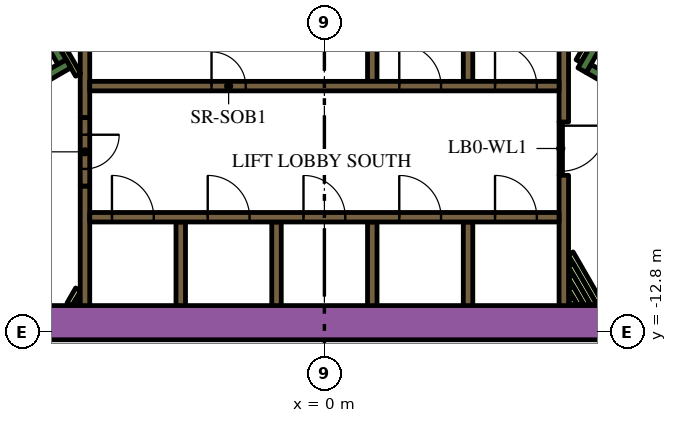
"""IFC4 building model, lengths in metres.
Left out: names, types, materials, properties, quantities, classifications, styles, units other than length and angle.
Written with IfcOpenShell. Run it as: python <this file> out.ifc"""

import sys

from ifc_helpers import new_model, si_unit, direction, frame, frame_2d, origin, place, context, subcontext, project, spatial, rectangle, extrude, element, fill, save


model = new_model("IFC4")
c1 = context("Model", 3, precision=1e-05, world=origin(), true_north=direction((0.0, 1.0)))
c2 = subcontext(c1, "Body", "Model", "MODEL_VIEW")
j1 = project(units=[si_unit("LENGTHUNIT", "METRE"), si_unit("PLANEANGLEUNIT", "RADIAN")], contexts=[c1])
p1 = place(None, origin())
s1 = spatial("IfcSite", under=j1, at=p1, CompositionType="ELEMENT")
p2 = place(p1, origin())
s2 = spatial("IfcBuilding", under=s1, at=p2, CompositionType="ELEMENT")
p3 = place(p2, frame((0.0, 0.0, 118.8)))
s3 = spatial("IfcBuildingStorey", under=s2, at=p3, CompositionType="ELEMENT", Elevation=118.8)
p4 = place(p3, frame((-12.019, -12.55, 0.0), z_axis=(0.0, 0.0, 1.0), x_axis=(1.0, 0.0, 0.0)))
e1 = element("IfcWall", 1, at=p4, inside=s3, PredefinedType="SOLIDWALL", context=c2, shape_type="SweptSolid", body=[
    extrude(rectangle(XDim=22.083, YDim=0.9, at=frame_2d((11.042, 0.0))), origin(), (0.0, 0.0, 1.0), 3.9),
])
p5 = place(p3, frame((12.84, -9.261, 0.0), z_axis=(0.0, 0.0, 1.0), x_axis=(-0.866013990052, 0.500019768644, 0.0)))
e2 = element("IfcWall", 2, at=p5, inside=s3, PredefinedType="SOLIDWALL", context=c2, shape_type="SweptSolid", body=[
    extrude(rectangle(XDim=6.8, YDim=0.25, at=frame_2d((3.4, 0.0))), origin(), (0.0, 0.0, 1.0), 3.9),
])
p6 = place(p3, frame((6.78, -5.906, 0.0), z_axis=(0.0, 0.0, 1.0), x_axis=(0.500223362819, 0.865896406789, 0.0)))
e3 = element("IfcWall", 3, at=p6, inside=s3, PredefinedType="SOLIDWALL", context=c2, shape_type="SweptSolid", body=[
    extrude(rectangle(XDim=0.675, YDim=0.25, at=frame_2d((0.337, 0.0))), origin(), (0.0, 0.0, 1.0), 3.9),
])
p7 = place(p3, frame((-12.84, -9.261, 0.0), z_axis=(0.0, 0.0, 1.0), x_axis=(0.866016039709, 0.500016218704, 0.0)))
e4 = element("IfcWall", 4, at=p7, inside=s3, PredefinedType="SOLIDWALL", context=c2, shape_type="SweptSolid", body=[
    extrude(rectangle(XDim=7.05, YDim=0.25, at=frame_2d((3.525, 0.0))), origin(), (0.0, 0.0, 1.0), 3.9),
])
p8 = place(p3, frame((-6.905, -5.69, 0.0), z_axis=(0.0, 0.0, 1.0), x_axis=(-0.500402024738, 0.865793170242, 0.0)))
e5 = element("IfcWall", 5, at=p8, inside=s3, PredefinedType="SOLIDWALL", context=c2, shape_type="SweptSolid", body=[
    extrude(rectangle(XDim=0.425, YDim=0.25, at=frame_2d((0.212, 0.0))), origin(), (0.0, 0.0, 1.0), 3.9),
])
p9 = place(p3, frame((-3.78, -12.1, 0.0), z_axis=(0.0, 0.0, 1.0), x_axis=(0.0, 1.0, 0.0)))
e6 = element("IfcWall", 6, at=p9, inside=s3, PredefinedType="SOLIDWALL", context=c2, shape_type="SweptSolid", body=[
    extrude(rectangle(XDim=2.2, YDim=0.25, at=frame_2d((1.1, 0.0))), origin(), (0.0, 0.0, 1.0), 3.9),
])
p10 = place(p3, frame((-6.3, -12.1, 0.0), z_axis=(0.0, 0.0, 1.0), x_axis=(0.0, 1.0, 0.0)))
e7 = element("IfcWall", 7, at=p10, inside=s3, PredefinedType="SOLIDWALL", context=c2, shape_type="SweptSolid", body=[
    extrude(rectangle(XDim=3.146, YDim=0.25, at=frame_2d((1.573, 0.0))), origin(), (0.0, 0.0, 1.0), 3.9),
])
for number, where, z_axis, x_axis in (
    (8, (3.78, -4.0, 0.0), (0.0, 0.0, 1.0), (0.0, -1.0, 0.0)),
    (9, (1.26, -4.0, 0.0), (0.0, 0.0, 1.0), (0.0, -1.0, 0.0)),
):
    element("IfcWall", number, at=place(p3, frame(where, z_axis=z_axis, x_axis=x_axis)), inside=s3, PredefinedType="SOLIDWALL", context=c2, shape_type="SweptSolid", body=[
        extrude(rectangle(XDim=2.2, YDim=0.25, at=frame_2d((1.1, 0.0))), origin(), (0.0, 0.0, 1.0), 3.9),
    ])
p11 = place(p3, frame((-6.3, -3.75, 0.0), z_axis=(0.0, 0.0, 1.0), x_axis=(0.0, -1.0, 0.0)))
e10 = element("IfcWall", 10, at=p11, inside=s3, PredefinedType="SOLIDWALL", context=c2, shape_type="SweptSolid", body=[
    extrude(rectangle(XDim=3.404, YDim=0.25, at=frame_2d((1.702, 0.0))), origin(), (0.0, 0.0, 1.0), 3.9),
])
p12 = place(p3, frame((6.3, -7.27, 0.0), z_axis=(0.0, 0.0, 1.0), x_axis=(0.0, 1.0, 0.0)))
e11 = element("IfcWall", 11, at=p12, inside=s3, PredefinedType="SOLIDWALL", context=c2, shape_type="SweptSolid", body=[
    extrude(rectangle(XDim=3.586, YDim=0.25, at=frame_2d((1.793, 0.0))), origin(), (0.0, 0.0, 1.0), 3.9),
])
p13 = place(p3, frame((6.3, -12.1, 0.0), z_axis=(0.0, 0.0, 1.0), x_axis=(0.0, 1.0, 0.0)))
e12 = element("IfcWall", 12, at=p13, inside=s3, PredefinedType="SOLIDWALL", context=c2, shape_type="SweptSolid", body=[
    extrude(rectangle(XDim=3.428, YDim=0.25, at=frame_2d((1.714, 0.0))), origin(), (0.0, 0.0, 1.0), 3.9),
])
for number, where, z_axis, x_axis in (
    (13, (3.78, -12.1, 0.0), (0.0, 0.0, 1.0), (0.0, 1.0, 0.0)),
    (14, (1.26, -12.1, 0.0), (0.0, 0.0, 1.0), (0.0, 1.0, 0.0)),
    (15, (-1.26, -12.1, 0.0), (0.0, 0.0, 1.0), (0.0, 1.0, 0.0)),
):
    element("IfcWall", number, at=place(p3, frame(where, z_axis=z_axis, x_axis=x_axis)), inside=s3, PredefinedType="SOLIDWALL", context=c2, shape_type="SweptSolid", body=[
        extrude(rectangle(XDim=2.2, YDim=0.25, at=frame_2d((1.1, 0.0))), origin(), (0.0, 0.0, 1.0), 3.9),
    ])
p14 = place(p3, frame((-6.708, -12.068, 0.0), z_axis=(0.0, 0.0, 1.0), x_axis=(0.500000789788, 0.8660249478, 0.0)))
e16 = element("IfcWall", 16, at=p14, inside=s3, PredefinedType="PARTITIONING", context=c2, shape_type="SweptSolid", body=[
    extrude(rectangle(XDim=0.456, YDim=0.15, at=frame_2d((0.228, 0.0))), origin(), (0.0, 0.0, 1.0), 2.75),
])
p15 = place(p3, frame((-6.534, -12.068, 0.0), z_axis=(0.0, 0.0, 1.0), x_axis=(0.500240224089, 0.865886665912, 0.0)))
e17 = element("IfcWall", 17, at=p15, inside=s3, PredefinedType="PARTITIONING", context=c2, shape_type="SweptSolid", body=[
    extrude(rectangle(XDim=0.109, YDim=0.15, at=frame_2d((0.054, 0.0))), origin(), (0.0, 0.0, 1.0), 2.75),
])
p16 = place(p3, frame((-6.48, -6.027, 0.0), z_axis=(0.0, 0.0, 1.0), x_axis=(-0.499927229454, 0.866067413802, 0.0)))
e18 = element("IfcWall", 18, at=p16, inside=s3, PredefinedType="PARTITIONING", context=c2, shape_type="SweptSolid", body=[
    extrude(rectangle(XDim=0.929, YDim=0.15, at=frame_2d((0.464, 0.0))), origin(), (0.0, 0.0, 1.0), 3.9),
])
p17 = place(p3, frame((6.48, -10.726, 0.0), z_axis=(0.0, 0.0, 1.0), x_axis=(0.500017819788, -0.86601511528, 0.0)))
e19 = element("IfcWall", 19, at=p17, inside=s3, PredefinedType="PARTITIONING", context=c2, shape_type="SweptSolid", body=[
    extrude(rectangle(XDim=1.55, YDim=0.15, at=frame_2d((0.775, 0.0))), origin(), (0.0, 0.0, 1.0), 2.75),
])
p18 = place(p3, frame((6.48, -11.026, 0.0), z_axis=(0.0, 0.0, 1.0), x_axis=(0.49995654735, -0.86605048973, 0.0)))
e20 = element("IfcWall", 20, at=p18, inside=s3, PredefinedType="PARTITIONING", context=c2, shape_type="SweptSolid", body=[
    extrude(rectangle(XDim=1.204, YDim=0.15, at=frame_2d((0.602, 0.0))), origin(), (0.0, 0.0, 1.0), 2.75),
])
p19 = place(p3, frame((6.48, -11.326, 0.0), z_axis=(0.0, 0.0, 1.0), x_axis=(0.500059337743, -0.865991142412, 0.0)))
e21 = element("IfcWall", 21, at=p19, inside=s3, PredefinedType="PARTITIONING", context=c2, shape_type="SweptSolid", body=[
    extrude(rectangle(XDim=0.857, YDim=0.15, at=frame_2d((0.429, 0.0))), origin(), (0.0, 0.0, 1.0), 2.75),
])
p20 = place(p3, frame((6.48, -11.626, 0.0), z_axis=(0.0, 0.0, 1.0), x_axis=(0.500301480982, -0.865851273677, 0.0)))
e22 = element("IfcWall", 22, at=p20, inside=s3, PredefinedType="PARTITIONING", context=c2, shape_type="SweptSolid", body=[
    extrude(rectangle(XDim=0.511, YDim=0.15, at=frame_2d((0.255, 0.0))), origin(), (0.0, 0.0, 1.0), 2.75),
])
p21 = place(p3, frame((6.48, -11.926, 0.0), z_axis=(0.0, 0.0, 1.0), x_axis=(0.500450775723, -0.86576499183, 0.0)))
e23 = element("IfcWall", 23, at=p21, inside=s3, PredefinedType="PARTITIONING", context=c2, shape_type="SweptSolid", body=[
    extrude(rectangle(XDim=0.164, YDim=0.15, at=frame_2d((0.082, 0.0))), origin(), (0.0, 0.0, 1.0), 2.75),
])
p22 = place(p3, frame((6.945, -5.222, 0.0), z_axis=(0.0, 0.0, 1.0), x_axis=(-0.499818422106, -0.866130212453, 0.0)))
e24 = element("IfcWall", 24, at=p22, inside=s3, PredefinedType="PARTITIONING", context=c2, shape_type="SweptSolid", body=[
    extrude(rectangle(XDim=0.514, YDim=0.15, at=frame_2d((0.257, 0.0))), origin(), (0.0, 0.0, 1.0), 2.75),
])
p23 = place(p3, frame((-6.175, -9.775, 0.0), z_axis=(0.0, 0.0, 1.0), x_axis=(1.0, 0.0, 0.0)))
e25 = element("IfcWall", 25, at=p23, inside=s3, PredefinedType="SOLIDWALL", context=c2, shape_type="SweptSolid", body=[
    extrude(rectangle(XDim=12.35, YDim=0.25, at=frame_2d((6.175, 0.0))), origin(), (0.0, 0.0, 1.0), 3.9),
])
p24 = place(p23, frame((0.585, 0.0, 0.0)))
e26 = element("IfcOpeningElement", 26, at=p24, cuts=e25, PredefinedType="OPENING", context=c2, shape_type="SweptSolid", body=[
    extrude(rectangle(XDim=1.1, YDim=2.1, at=frame_2d((0.55, 1.05))), frame((0.0, 0.135, 0.0), z_axis=(0.0, -1.0, 0.0), x_axis=(1.0, 0.0, 0.0)), (0.0, 0.0, 1.0), 0.27),
])
p25 = place(p23, frame((3.105, 0.0, 0.0)))
e27 = element("IfcOpeningElement", 27, at=p25, cuts=e25, PredefinedType="OPENING", context=c2, shape_type="SweptSolid", body=[
    extrude(rectangle(XDim=1.1, YDim=2.1, at=frame_2d((0.55, 1.05))), frame((0.0, 0.135, 0.0), z_axis=(0.0, -1.0, 0.0), x_axis=(1.0, 0.0, 0.0)), (0.0, 0.0, 1.0), 0.27),
])
p26 = place(p23, frame((5.625, 0.0, 0.0)))
e28 = element("IfcOpeningElement", 28, at=p26, cuts=e25, PredefinedType="OPENING", context=c2, shape_type="SweptSolid", body=[
    extrude(rectangle(XDim=1.1, YDim=2.1, at=frame_2d((0.55, 1.05))), frame((0.0, 0.135, 0.0), z_axis=(0.0, -1.0, 0.0), x_axis=(1.0, 0.0, 0.0)), (0.0, 0.0, 1.0), 0.27),
])
p27 = place(p23, frame((8.145, 0.0, 0.0)))
e29 = element("IfcOpeningElement", 29, at=p27, cuts=e25, PredefinedType="OPENING", context=c2, shape_type="SweptSolid", body=[
    extrude(rectangle(XDim=1.1, YDim=2.1, at=frame_2d((0.55, 1.05))), frame((0.0, 0.135, 0.0), z_axis=(0.0, -1.0, 0.0), x_axis=(1.0, 0.0, 0.0)), (0.0, 0.0, 1.0), 0.27),
])
p28 = place(p23, frame((10.665, 0.0, 0.0)))
e30 = element("IfcOpeningElement", 30, at=p28, cuts=e25, PredefinedType="OPENING", context=c2, shape_type="SweptSolid", body=[
    extrude(rectangle(XDim=1.1, YDim=2.1, at=frame_2d((0.55, 1.05))), frame((0.0, 0.135, 0.0), z_axis=(0.0, -1.0, 0.0), x_axis=(1.0, 0.0, 0.0)), (0.0, 0.0, 1.0), 0.27),
])
p29 = place(p3, frame((-6.175, -6.325, 0.0), z_axis=(0.0, 0.0, 1.0), x_axis=(1.0, 0.0, 0.0)))
e31 = element("IfcWall", 31, at=p29, inside=s3, PredefinedType="SOLIDWALL", context=c2, shape_type="SweptSolid", body=[
    extrude(rectangle(XDim=12.35, YDim=0.25, at=frame_2d((6.175, 0.0))), origin(), (0.0, 0.0, 1.0), 3.9),
])
p30 = place(p29, frame((3.205, 0.0, 0.0)))
e32 = element("IfcOpeningElement", 32, at=p30, cuts=e31, PredefinedType="OPENING", context=c2, shape_type="SweptSolid", body=[
    extrude(rectangle(XDim=0.9, YDim=2.1, at=frame_2d((0.45, 1.05))), frame((0.0, 0.135, 0.0), z_axis=(0.0, -1.0, 0.0), x_axis=(1.0, 0.0, 0.0)), (0.0, 0.0, 1.0), 0.27),
])
p31 = place(p29, frame((8.145, 0.0, 0.0)))
e33 = element("IfcOpeningElement", 33, at=p31, cuts=e31, PredefinedType="OPENING", context=c2, shape_type="SweptSolid", body=[
    extrude(rectangle(XDim=1.1, YDim=2.1, at=frame_2d((0.55, 1.05))), frame((0.0, 0.135, 0.0), z_axis=(0.0, -1.0, 0.0), x_axis=(1.0, 0.0, 0.0)), (0.0, 0.0, 1.0), 0.27),
])
p32 = place(p29, frame((10.665, 0.0, 0.0)))
e34 = element("IfcOpeningElement", 34, at=p32, cuts=e31, PredefinedType="OPENING", context=c2, shape_type="SweptSolid", body=[
    extrude(rectangle(XDim=1.1, YDim=2.1, at=frame_2d((0.55, 1.05))), frame((0.0, 0.135, 0.0), z_axis=(0.0, -1.0, 0.0), x_axis=(1.0, 0.0, 0.0)), (0.0, 0.0, 1.0), 0.27),
])
p33 = place(p3, frame((-6.3, -7.154, 0.0), z_axis=(0.0, 0.0, 1.0), x_axis=(0.0, -1.0, 0.0)))
e35 = element("IfcWall", 35, at=p33, inside=s3, PredefinedType="SOLIDWALL", context=c2, shape_type="SweptSolid", body=[
    extrude(rectangle(XDim=1.8, YDim=0.25, at=frame_2d((0.9, 0.0))), origin(), (0.0, 0.0, 1.0), 3.9),
])
p34 = place(p33, frame((0.45, 0.0, 0.0)))
e36 = element("IfcOpeningElement", 36, at=p34, cuts=e35, PredefinedType="OPENING", context=c2, shape_type="SweptSolid", body=[
    extrude(rectangle(XDim=0.9, YDim=2.1, at=frame_2d((0.45, 1.05))), frame((0.0, 0.135, 0.0), z_axis=(0.0, -1.0, 0.0), x_axis=(1.0, 0.0, 0.0)), (0.0, 0.0, 1.0), 0.27),
])
p35 = place(p3, frame((6.22, -7.266, 0.0), z_axis=(0.0, 0.0, 1.0), x_axis=(0.0, -1.0, 0.0)))
e37 = element("IfcWall", 37, at=p35, inside=s3, PredefinedType="PARTITIONING", context=c2, shape_type="SweptSolid", body=[
    extrude(rectangle(XDim=1.4, YDim=0.09, at=frame_2d((0.7, 0.0))), origin(), (0.0, 0.0, 1.0), 2.75),
])
p36 = place(p35, frame((0.1, 0.0, 0.0)))
e38 = element("IfcOpeningElement", 38, at=p36, cuts=e37, PredefinedType="OPENING", context=c2, shape_type="SweptSolid", body=[
    extrude(rectangle(XDim=1.2, YDim=2.1, at=frame_2d((0.6, 1.05))), frame((0.0, 0.055, 0.0), z_axis=(0.0, -1.0, 0.0), x_axis=(1.0, 0.0, 0.0)), (0.0, 0.0, 1.0), 0.11),
])
p37 = place(p24, origin())
e39 = element("IfcDoor", 39, at=p37, inside=s3, OperationType="DOUBLE_DOOR_SLIDING", PredefinedType="DOOR", context=c2, shape_type="SweptSolid", body=[
    extrude(rectangle(XDim=1.1, YDim=2.1, at=frame_2d((0.55, 1.05))), frame((0.0, 0.025, 0.0), z_axis=(0.0, -1.0, 0.0), x_axis=(1.0, 0.0, 0.0)), (0.0, 0.0, 1.0), 0.05),
])
fill(e26, e39)
p38 = place(p25, origin())
e40 = element("IfcDoor", 40, at=p38, inside=s3, OperationType="DOUBLE_DOOR_SLIDING", PredefinedType="DOOR", context=c2, shape_type="SweptSolid", body=[
    extrude(rectangle(XDim=1.1, YDim=2.1, at=frame_2d((0.55, 1.05))), frame((0.0, 0.025, 0.0), z_axis=(0.0, -1.0, 0.0), x_axis=(1.0, 0.0, 0.0)), (0.0, 0.0, 1.0), 0.05),
])
fill(e27, e40)
p39 = place(p26, origin())
e41 = element("IfcDoor", 41, at=p39, inside=s3, OperationType="DOUBLE_DOOR_SLIDING", PredefinedType="DOOR", context=c2, shape_type="SweptSolid", body=[
    extrude(rectangle(XDim=1.1, YDim=2.1, at=frame_2d((0.55, 1.05))), frame((0.0, 0.025, 0.0), z_axis=(0.0, -1.0, 0.0), x_axis=(1.0, 0.0, 0.0)), (0.0, 0.0, 1.0), 0.05),
])
fill(e28, e41)
p40 = place(p27, origin())
e42 = element("IfcDoor", 42, at=p40, inside=s3, OperationType="DOUBLE_DOOR_SLIDING", PredefinedType="DOOR", context=c2, shape_type="SweptSolid", body=[
    extrude(rectangle(XDim=1.1, YDim=2.1, at=frame_2d((0.55, 1.05))), frame((0.0, 0.025, 0.0), z_axis=(0.0, -1.0, 0.0), x_axis=(1.0, 0.0, 0.0)), (0.0, 0.0, 1.0), 0.05),
])
fill(e29, e42)
p41 = place(p28, origin())
e43 = element("IfcDoor", 43, at=p41, inside=s3, OperationType="DOUBLE_DOOR_SLIDING", PredefinedType="DOOR", context=c2, shape_type="SweptSolid", body=[
    extrude(rectangle(XDim=1.1, YDim=2.1, at=frame_2d((0.55, 1.05))), frame((0.0, 0.025, 0.0), z_axis=(0.0, -1.0, 0.0), x_axis=(1.0, 0.0, 0.0)), (0.0, 0.0, 1.0), 0.05),
])
fill(e30, e43)
p42 = place(p30, origin())
e44 = element("IfcDoor", 44, at=p42, inside=s3, OperationType="SINGLE_SWING_LEFT", PredefinedType="DOOR", context=c2, shape_type="SweptSolid", body=[
    extrude(rectangle(XDim=0.9, YDim=2.1, at=frame_2d((0.45, 1.05))), frame((0.0, 0.025, 0.0), z_axis=(0.0, -1.0, 0.0), x_axis=(1.0, 0.0, 0.0)), (0.0, 0.0, 1.0), 0.05),
])
fill(e32, e44)
p43 = place(p31, origin())
e45 = element("IfcDoor", 45, at=p43, inside=s3, OperationType="DOUBLE_DOOR_SLIDING", PredefinedType="DOOR", context=c2, shape_type="SweptSolid", body=[
    extrude(rectangle(XDim=1.1, YDim=2.1, at=frame_2d((0.55, 1.05))), frame((0.0, 0.025, 0.0), z_axis=(0.0, -1.0, 0.0), x_axis=(1.0, 0.0, 0.0)), (0.0, 0.0, 1.0), 0.05),
])
fill(e33, e45)
p44 = place(p32, origin())
e46 = element("IfcDoor", 46, at=p44, inside=s3, OperationType="DOUBLE_DOOR_SLIDING", PredefinedType="DOOR", context=c2, shape_type="SweptSolid", body=[
    extrude(rectangle(XDim=1.1, YDim=2.1, at=frame_2d((0.55, 1.05))), frame((0.0, 0.025, 0.0), z_axis=(0.0, -1.0, 0.0), x_axis=(1.0, 0.0, 0.0)), (0.0, 0.0, 1.0), 0.05),
])
fill(e34, e46)
p45 = place(p34, origin())
e47 = element("IfcDoor", 47, at=p45, inside=s3, OperationType="SINGLE_SWING_LEFT", PredefinedType="DOOR", context=c2, shape_type="SweptSolid", body=[
    extrude(rectangle(XDim=0.9, YDim=2.1, at=frame_2d((0.45, 1.05))), frame((0.0, 0.025, 0.0), z_axis=(0.0, -1.0, 0.0), x_axis=(1.0, 0.0, 0.0)), (0.0, 0.0, 1.0), 0.05),
])
fill(e36, e47)
p46 = place(p36, origin())
e48 = element("IfcDoor", 48, at=p46, inside=s3, OperationType="SINGLE_SWING_LEFT", PredefinedType="DOOR", context=c2, shape_type="SweptSolid", body=[
    extrude(rectangle(XDim=1.2, YDim=2.1, at=frame_2d((0.6, 1.05))), frame((0.0, 0.025, 0.0), z_axis=(0.0, -1.0, 0.0), x_axis=(1.0, 0.0, 0.0)), (0.0, 0.0, 1.0), 0.05),
])
fill(e38, e48)
save(model, sys.argv[1])
